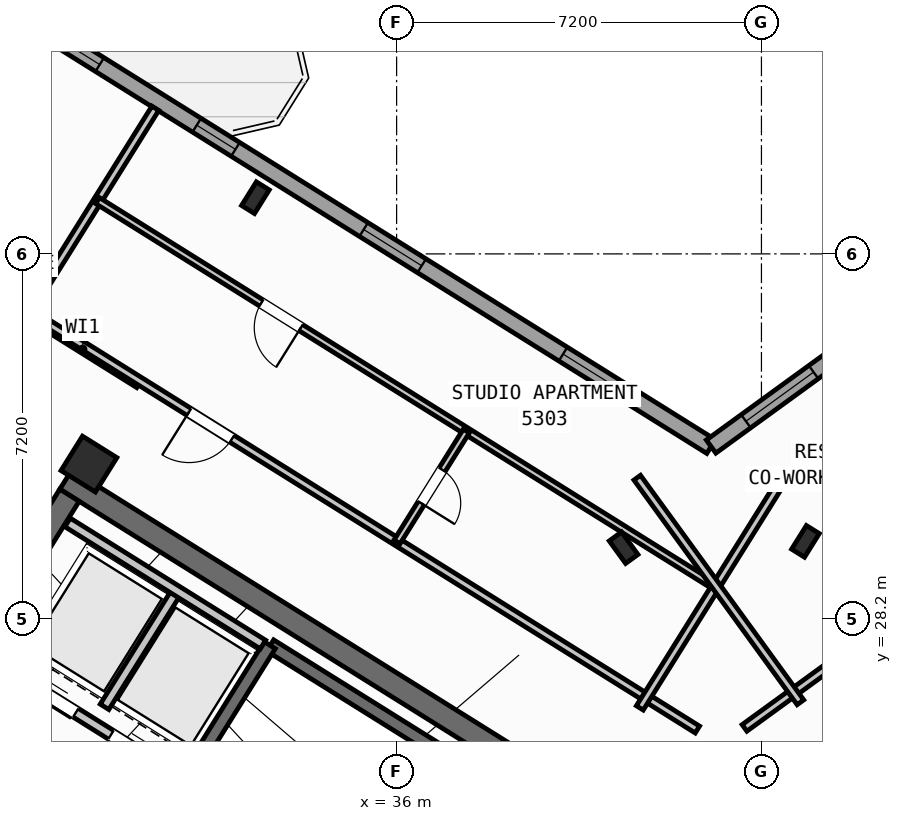
"""IFC4 building model, lengths in metres.
Left out: names, types, materials, properties, quantities, classifications, styles, units other than length and angle.
Written with IfcOpenShell. Run it as: python <this file> out.ifc"""

import sys

from ifc_helpers import new_model, si_unit, direction, frame, frame_2d, origin, origin_2d, place, context, subcontext, project, spatial, rectangle, hollow_rectangle, i_section, extrude, source, transform, mapped, element, fill, save


model = new_model("IFC4")
c1 = context("Model", 3, precision=1e-05, world=origin(), true_north=direction((0.0, 1.0)))
c2 = subcontext(c1, "Body", "Model", "MODEL_VIEW")
j1 = project(units=[si_unit("LENGTHUNIT", "METRE"), si_unit("PLANEANGLEUNIT", "RADIAN")], contexts=[c1])
p1 = place(None, origin())
s1 = spatial("IfcSite", under=j1, at=p1, CompositionType="ELEMENT")
p2 = place(p1, origin())
s2 = spatial("IfcBuilding", under=s1, at=p2, CompositionType="ELEMENT")
p3 = place(p2, frame((0.0, 0.0, 211.2)))
s3 = spatial("IfcBuildingStorey", under=s2, at=p3, CompositionType="ELEMENT", Elevation=211.2)
p4 = place(p3, frame((40.531, 24.036, 0.0), z_axis=(0.0, 0.0, 1.0), x_axis=(-0.848048787466, 0.529918157905, 0.0)))
e1 = element("IfcWall", 1, at=p4, inside=s3, PredefinedType="SHEAR", context=c2, shape_type="SweptSolid", body=[
    extrude(rectangle(XDim=13.04, YDim=0.45, at=frame_2d((6.52, 0.0))), origin(), (0.0, 0.0, 1.0), 3.35),
])
p5 = place(p3, frame((29.544, 30.636, 0.0), z_axis=(0.0, 0.0, 1.0), x_axis=(-0.529902075036, -0.848058836916, 0.0)))
e2 = element("IfcWall", 2, at=p5, inside=s3, PredefinedType="SHEAR", context=c2, shape_type="SweptSolid", body=[
    extrude(rectangle(XDim=3.625, YDim=0.45, at=frame_2d((1.812, 0.0))), origin(), (0.0, 0.0, 1.0), 3.35),
])
p6 = place(p3, frame((44.406, 24.172, 0.0), z_axis=(0.0, 0.0, 1.0), x_axis=(0.809012867805, 0.587790931986, 0.0)))
e3 = element("IfcWall", 3, at=p6, inside=s3, PredefinedType="SHEAR", context=c2, shape_type="SweptSolid", body=[
    extrude(rectangle(XDim=12.24, YDim=0.45, at=frame_2d((6.12, 0.0))), origin(), (0.0, 0.0, 1.0), 3.35),
])
m1 = source(origin(), c2, "Body", "SweptSolid", [
    extrude(i_section(OverallWidth=0.3, OverallDepth=0.55, WebThickness=0.015, FlangeThickness=0.029, at=origin_2d()), origin(), (0.0, 0.0, 1.0), 3.6),
])
for number, where, z_axis, x_axis in (
    (4, (44.068, 29.726, 0.0), (0.0, 0.0, 1.0), (-0.848, 0.53, 0.0)),
    (5, (33.213, 36.509, 0.0), (0.0, 0.0, 1.0), (-0.848, 0.53, 0.0)),
):
    element("IfcColumn", number, at=place(p3, frame(where, z_axis=z_axis, x_axis=x_axis)), inside=s3, PredefinedType="COLUMN", context=c2, shape_type="MappedRepresentation", body=[
        mapped(m1, transform((0.0, 0.0, 0.0), scale=1.0)),
    ])
m2 = source(origin(), c2, "Body", "SweptSolid", [
    extrude(hollow_rectangle(XDim=0.8, YDim=0.8, WallThickness=0.032, at=origin_2d()), origin(), (0.0, 0.0, 1.0), 3.6),
])
p7 = place(p3, frame((29.928, 31.251, 0.0), z_axis=(0.0, 0.0, 1.0), x_axis=(-0.848048096156, 0.529919264233, 0.0)))
e6 = element("IfcColumn", 6, at=p7, inside=s3, PredefinedType="COLUMN", context=c2, shape_type="MappedRepresentation", body=[
    mapped(m2, transform((0.0, 0.0, 0.0), scale=1.0)),
])
p8 = place(p3, frame((40.479, 29.601, 0.0), z_axis=(0.0, 0.0, 1.0), x_axis=(0.809016994375, 0.587785252292, 0.0)))
e7 = element("IfcColumn", 7, at=p8, inside=s3, PredefinedType="COLUMN", context=c2, shape_type="MappedRepresentation", body=[
    mapped(m1, transform((0.0, 0.0, 0.0), scale=1.0)),
])
p9 = place(p3, frame((31.76, 12.183, 0.0), z_axis=(0.0, 0.0, 1.0), x_axis=(-0.848047074256, 0.529920899612, 0.0)))
e8 = element("IfcWall", 8, at=p9, inside=s3, PredefinedType="STANDARD", context=c2, shape_type="SweptSolid", body=[
    extrude(rectangle(XDim=30.652, YDim=0.32, at=frame_2d((15.326, 0.0))), origin(), (0.0, 0.0, 1.0), 3.35),
])
p10 = place(p9, frame((15.166, 0.0, 0.0)))
e9 = element("IfcOpeningElement", 9, at=p10, cuts=e8, PredefinedType="OPENING", context=c2, shape_type="SweptSolid", body=[
    extrude(rectangle(XDim=1.2, YDim=2.15, at=frame_2d((0.6, 1.075))), frame((0.0, 0.17, 0.0), z_axis=(0.0, -1.0, 0.0), x_axis=(1.0, 0.0, 0.0)), (0.0, 0.0, 1.0), 0.34),
])
p11 = place(p9, frame((2.24, 0.0, 0.9)))
e10 = element("IfcOpeningElement", 10, at=p11, cuts=e8, PredefinedType="OPENING", context=c2, shape_type="SweptSolid", body=[
    extrude(rectangle(XDim=1.65, YDim=1.45, at=frame_2d((0.825, 0.725))), frame((0.0, 0.17, 0.0), z_axis=(0.0, -1.0, 0.0), x_axis=(1.0, 0.0, 0.0)), (0.0, 0.0, 1.0), 0.34),
])
p12 = place(p9, frame((7.469, 0.0, 0.9)))
e11 = element("IfcOpeningElement", 11, at=p12, cuts=e8, PredefinedType="OPENING", context=c2, shape_type="SweptSolid", body=[
    extrude(rectangle(XDim=1.65, YDim=1.45, at=frame_2d((0.825, 0.725))), frame((0.0, 0.17, 0.0), z_axis=(0.0, -1.0, 0.0), x_axis=(1.0, 0.0, 0.0)), (0.0, 0.0, 1.0), 0.34),
])
p13 = place(p9, frame((12.623, 0.0, 1.0)))
e12 = element("IfcOpeningElement", 12, at=p13, cuts=e8, PredefinedType="OPENING", context=c2, shape_type="SweptSolid", body=[
    extrude(rectangle(XDim=0.9, YDim=1.25, at=frame_2d((0.45, 0.625))), frame((0.0, 0.17, 0.0), z_axis=(0.0, -1.0, 0.0), x_axis=(1.0, 0.0, 0.0)), (0.0, 0.0, 1.0), 0.34),
])
p14 = place(p9, frame((19.715, 0.0, 1.0)))
e13 = element("IfcOpeningElement", 13, at=p14, cuts=e8, PredefinedType="OPENING", context=c2, shape_type="SweptSolid", body=[
    extrude(rectangle(XDim=0.9, YDim=1.25, at=frame_2d((0.45, 0.625))), frame((0.0, 0.17, 0.0), z_axis=(0.0, -1.0, 0.0), x_axis=(1.0, 0.0, 0.0)), (0.0, 0.0, 1.0), 0.34),
])
p15 = place(p9, frame((25.566, 0.0, 0.9)))
e14 = element("IfcOpeningElement", 14, at=p15, cuts=e8, PredefinedType="OPENING", context=c2, shape_type="SweptSolid", body=[
    extrude(rectangle(XDim=1.65, YDim=1.45, at=frame_2d((0.825, 0.725))), frame((0.0, 0.17, 0.0), z_axis=(0.0, -1.0, 0.0), x_axis=(1.0, 0.0, 0.0)), (0.0, 0.0, 1.0), 0.34),
])
p16 = place(p9, frame((28.896, 0.0, 1.0)))
e15 = element("IfcOpeningElement", 15, at=p16, cuts=e8, PredefinedType="OPENING", context=c2, shape_type="SweptSolid", body=[
    extrude(rectangle(XDim=0.9, YDim=1.25, at=frame_2d((0.45, 0.625))), frame((0.0, 0.17, 0.0), z_axis=(0.0, -1.0, 0.0), x_axis=(1.0, 0.0, 0.0)), (0.0, 0.0, 1.0), 0.34),
])
p17 = place(p3, frame((17.424, 47.083, 0.0), z_axis=(0.0, 0.0, 1.0), x_axis=(0.848049927979, -0.529916332693, 0.0)))
e16 = element("IfcWall", 16, at=p17, inside=s3, PredefinedType="STANDARD", context=c2, shape_type="SweptSolid", body=[
    extrude(rectangle(XDim=29.223, YDim=0.32, at=frame_2d((14.612, 0.0))), origin(), (0.0, 0.0, 1.0), 3.35),
])
p18 = place(p17, frame((2.526, 0.0, 0.0)))
e17 = element("IfcOpeningElement", 17, at=p18, cuts=e16, PredefinedType="OPENING", context=c2, shape_type="SweptSolid", body=[
    extrude(rectangle(XDim=1.05, YDim=2.15, at=frame_2d((0.525, 1.075))), frame((0.0, 0.17, 0.0), z_axis=(0.0, -1.0, 0.0), x_axis=(1.0, 0.0, 0.0)), (0.0, 0.0, 1.0), 0.34),
])
p19 = place(p17, frame((0.653, 0.0, 0.9)))
e18 = element("IfcOpeningElement", 18, at=p19, cuts=e16, PredefinedType="OPENING", context=c2, shape_type="SweptSolid", body=[
    extrude(rectangle(XDim=1.35, YDim=1.45, at=frame_2d((0.675, 0.725))), frame((0.0, 0.17, 0.0), z_axis=(0.0, -1.0, 0.0), x_axis=(1.0, 0.0, 0.0)), (0.0, 0.0, 1.0), 0.34),
])
p20 = place(p17, frame((6.897, 0.0, 1.0)))
e19 = element("IfcOpeningElement", 19, at=p20, cuts=e16, PredefinedType="OPENING", context=c2, shape_type="SweptSolid", body=[
    extrude(rectangle(XDim=0.9, YDim=1.25, at=frame_2d((0.45, 0.625))), frame((0.0, 0.17, 0.0), z_axis=(0.0, -1.0, 0.0), x_axis=(1.0, 0.0, 0.0)), (0.0, 0.0, 1.0), 0.34),
])
p21 = place(p17, frame((9.602, 0.0, 0.95)))
e20 = element("IfcOpeningElement", 20, at=p21, cuts=e16, PredefinedType="OPENING", context=c2, shape_type="SweptSolid", body=[
    extrude(rectangle(XDim=1.95, YDim=1.35, at=frame_2d((0.975, 0.675))), frame((0.0, 0.17, 0.0), z_axis=(0.0, -1.0, 0.0), x_axis=(1.0, 0.0, 0.0)), (0.0, 0.0, 1.0), 0.34),
])
p22 = place(p17, frame((14.096, 0.0, 1.0)))
e21 = element("IfcOpeningElement", 21, at=p22, cuts=e16, PredefinedType="OPENING", context=c2, shape_type="SweptSolid", body=[
    extrude(rectangle(XDim=0.9, YDim=1.25, at=frame_2d((0.45, 0.625))), frame((0.0, 0.17, 0.0), z_axis=(0.0, -1.0, 0.0), x_axis=(1.0, 0.0, 0.0)), (0.0, 0.0, 1.0), 0.34),
])
p23 = place(p17, frame((17.254, 0.0, 1.0)))
e22 = element("IfcOpeningElement", 22, at=p23, cuts=e16, PredefinedType="OPENING", context=c2, shape_type="SweptSolid", body=[
    extrude(rectangle(XDim=0.9, YDim=1.25, at=frame_2d((0.45, 0.625))), frame((0.0, 0.17, 0.0), z_axis=(0.0, -1.0, 0.0), x_axis=(1.0, 0.0, 0.0)), (0.0, 0.0, 1.0), 0.34),
])
p24 = place(p17, frame((21.139, 0.0, 0.9)))
e23 = element("IfcOpeningElement", 23, at=p24, cuts=e16, PredefinedType="OPENING", context=c2, shape_type="SweptSolid", body=[
    extrude(rectangle(XDim=1.35, YDim=1.45, at=frame_2d((0.675, 0.725))), frame((0.0, 0.17, 0.0), z_axis=(0.0, -1.0, 0.0), x_axis=(1.0, 0.0, 0.0)), (0.0, 0.0, 1.0), 0.34),
])
p25 = place(p17, frame((25.778, 0.0, 0.9)))
e24 = element("IfcOpeningElement", 24, at=p25, cuts=e16, PredefinedType="OPENING", context=c2, shape_type="SweptSolid", body=[
    extrude(rectangle(XDim=1.35, YDim=1.45, at=frame_2d((0.675, 0.725))), frame((0.0, 0.17, 0.0), z_axis=(0.0, -1.0, 0.0), x_axis=(1.0, 0.0, 0.0)), (0.0, 0.0, 1.0), 0.34),
])
p26 = place(p3, frame((42.207, 31.597, 0.0), z_axis=(0.0, 0.0, 1.0), x_axis=(0.809020333377, 0.587780656523, 0.0)))
e25 = element("IfcWall", 25, at=p26, inside=s3, PredefinedType="STANDARD", context=c2, shape_type="SweptSolid", body=[
    extrude(rectangle(XDim=15.223, YDim=0.32, at=frame_2d((7.611, 0.0))), origin(), (0.0, 0.0, 1.0), 3.35),
])
p27 = place(p26, frame((12.82, 0.0, 0.0)))
e26 = element("IfcOpeningElement", 26, at=p27, cuts=e25, PredefinedType="OPENING", context=c2, shape_type="SweptSolid", body=[
    extrude(rectangle(XDim=1.05, YDim=2.15, at=frame_2d((0.525, 1.075))), frame((0.0, 0.17, 0.0), z_axis=(0.0, -1.0, 0.0), x_axis=(1.0, 0.0, 0.0)), (0.0, 0.0, 1.0), 0.34),
])
p28 = place(p26, frame((0.85, 0.0, 0.9)))
e27 = element("IfcOpeningElement", 27, at=p28, cuts=e25, PredefinedType="OPENING", context=c2, shape_type="SweptSolid", body=[
    extrude(rectangle(XDim=1.65, YDim=1.45, at=frame_2d((0.825, 0.725))), frame((0.0, 0.17, 0.0), z_axis=(0.0, -1.0, 0.0), x_axis=(1.0, 0.0, 0.0)), (0.0, 0.0, 1.0), 0.34),
])
p29 = place(p26, frame((5.769, 0.0, 0.9)))
e28 = element("IfcOpeningElement", 28, at=p29, cuts=e25, PredefinedType="OPENING", context=c2, shape_type="SweptSolid", body=[
    extrude(rectangle(XDim=1.35, YDim=1.45, at=frame_2d((0.675, 0.725))), frame((0.0, 0.17, 0.0), z_axis=(0.0, -1.0, 0.0), x_axis=(1.0, 0.0, 0.0)), (0.0, 0.0, 1.0), 0.34),
])
p30 = place(p26, frame((10.219, 0.0, 1.0)))
e29 = element("IfcOpeningElement", 29, at=p30, cuts=e25, PredefinedType="OPENING", context=c2, shape_type="SweptSolid", body=[
    extrude(rectangle(XDim=0.9, YDim=1.25, at=frame_2d((0.45, 0.625))), frame((0.0, 0.17, 0.0), z_axis=(0.0, -1.0, 0.0), x_axis=(1.0, 0.0, 0.0)), (0.0, 0.0, 1.0), 0.34),
])
p31 = place(p3, frame((39.721, 23.788, 0.0), z_axis=(0.0, 0.0, 1.0), x_axis=(-0.848054434086, 0.529909121291, 0.0)))
e30 = element("IfcWall", 30, at=p31, inside=s3, PredefinedType="SHEAR", context=c2, shape_type="SweptSolid", body=[
    extrude(rectangle(XDim=7.33, YDim=0.26, at=frame_2d((3.665, 0.0))), origin(), (0.0, 0.0, 1.0), 3.35),
])
p32 = place(p3, frame((33.496, 27.677, 0.0), z_axis=(0.0, 0.0, 1.0), x_axis=(-0.529908658664, -0.84805472316, 0.0)))
e31 = element("IfcWall", 31, at=p32, inside=s3, PredefinedType="SHEAR", context=c2, shape_type="SweptSolid", body=[
    extrude(rectangle(XDim=3.16, YDim=0.26, at=frame_2d((1.58, 0.0))), origin(), (0.0, 0.0, 1.0), 3.35),
])
p33 = place(p3, frame((31.822, 24.998, 0.0), z_axis=(0.0, 0.0, 1.0), x_axis=(-0.848054125777, 0.529909614701, 0.0)))
e32 = element("IfcWall", 32, at=p33, inside=s3, PredefinedType="STANDARD", context=c2, shape_type="SweptSolid", body=[
    extrude(rectangle(XDim=4.668, YDim=0.2, at=frame_2d((2.334, 0.0))), origin(), (0.0, 0.0, 1.0), 3.34),
])
p34 = place(p33, frame((0.52, 0.0, 0.0)))
e33 = element("IfcOpeningElement", 33, at=p34, cuts=e32, PredefinedType="OPENING", context=c2, shape_type="SweptSolid", body=[
    extrude(rectangle(XDim=1.2, YDim=2.15, at=frame_2d((0.6, 1.075))), frame((0.0, 0.11, 0.0), z_axis=(0.0, -1.0, 0.0), x_axis=(1.0, 0.0, 0.0)), (0.0, 0.0, 1.0), 0.22),
])
p35 = place(p33, frame((2.54, 0.0, 0.0)))
e34 = element("IfcOpeningElement", 34, at=p35, cuts=e32, PredefinedType="OPENING", context=c2, shape_type="SweptSolid", body=[
    extrude(rectangle(XDim=1.2, YDim=2.15, at=frame_2d((0.6, 1.075))), frame((0.0, 0.11, 0.0), z_axis=(0.0, -1.0, 0.0), x_axis=(1.0, 0.0, 0.0)), (0.0, 0.0, 1.0), 0.22),
])
p36 = place(p3, frame((31.645, 28.716, 0.0), z_axis=(0.0, 0.0, 1.0), x_axis=(-0.52986693015, -0.848080795876, 0.0)))
e35 = element("IfcWall", 35, at=p36, inside=s3, PredefinedType="STANDARD", context=c2, shape_type="SweptSolid", body=[
    extrude(rectangle(XDim=2.66, YDim=0.2, at=frame_2d((1.33, 0.0))), origin(), (0.0, 0.0, 1.0), 3.34),
])
p37 = place(p3, frame((33.363, 27.69, 0.0), z_axis=(0.0, 0.0, 1.0), x_axis=(-0.84804957148, 0.529916903215, 0.0)))
e36 = element("IfcWall", 36, at=p37, inside=s3, PredefinedType="STANDARD", context=c2, shape_type="SweptSolid", body=[
    extrude(rectangle(XDim=4.548, YDim=0.2, at=frame_2d((2.274, 0.0))), origin(), (0.0, 0.0, 1.0), 3.34),
])
p38 = place(p3, frame((30.914, 32.829, 0.0), z_axis=(0.0, 0.0, 1.0), x_axis=(-0.848008813643, 0.529982124211, 0.0)))
e37 = element("IfcWall", 37, at=p38, inside=s3, PredefinedType="PARTITIONING", context=c2, shape_type="SweptSolid", body=[
    extrude(rectangle(XDim=2.61, YDim=0.16, at=frame_2d((1.305, 0.0))), origin(), (0.0, 0.0, 1.0), 3.34),
])
p39 = place(p3, frame((31.239, 38.274, 0.0), z_axis=(0.0, 0.0, 1.0), x_axis=(-0.529925472745, -0.848044216616, 0.0)))
e38 = element("IfcWall", 38, at=p39, inside=s3, PredefinedType="PARTITIONING", context=c2, shape_type="SweptSolid", body=[
    extrude(rectangle(XDim=11.65, YDim=0.16, at=frame_2d((5.825, 0.0))), origin(), (0.0, 0.0, 1.0), 3.34),
])
p40 = place(p3, frame((41.936, 26.012, 0.0), z_axis=(0.0, 0.0, 1.0), x_axis=(-0.848051154596, 0.529914369676, 0.0)))
e39 = element("IfcWall", 39, at=p40, inside=s3, PredefinedType="PARTITIONING", context=c2, shape_type="SweptSolid", body=[
    extrude(rectangle(XDim=15.57, YDim=0.16, at=frame_2d((7.785, 0.0))), origin(), (0.0, 0.0, 1.0), 3.34),
])
p41 = place(p40, frame((10.83, 0.0, 0.0)))
e40 = element("IfcOpeningElement", 40, at=p41, cuts=e39, PredefinedType="OPENING", context=c2, shape_type="SweptSolid", body=[
    extrude(rectangle(XDim=1.0, YDim=2.1, at=frame_2d((0.5, 1.05))), frame((0.0, 0.09, 0.0), z_axis=(0.0, -1.0, 0.0), x_axis=(1.0, 0.0, 0.0)), (0.0, 0.0, 1.0), 0.18),
])
p42 = place(p3, frame((43.704, 31.086, 0.0), z_axis=(0.0, 0.0, 1.0), x_axis=(-0.529906828443, -0.848055866774, 0.0)))
e41 = element("IfcWall", 41, at=p42, inside=s3, PredefinedType="PARTITIONING", context=c2, shape_type="SweptSolid", body=[
    extrude(rectangle(XDim=5.48, YDim=0.16, at=frame_2d((2.74, 0.0))), origin(), (0.0, 0.0, 1.0), 3.34),
])
p43 = place(p3, frame((42.226, 28.873, 0.0), z_axis=(0.0, 0.0, 1.0), x_axis=(-0.848049134363, 0.529917602752, 0.0)))
e42 = element("IfcWall", 42, at=p43, inside=s3, PredefinedType="PLUMBINGWALL", context=c2, shape_type="SweptSolid", body=[
    extrude(rectangle(XDim=14.3, YDim=0.14, at=frame_2d((7.15, 0.0))), origin(), (0.0, 0.0, 1.0), 3.34),
])
p44 = place(p43, frame((9.57, 0.0, 0.0)))
e43 = element("IfcOpeningElement", 43, at=p44, cuts=e42, PredefinedType="OPENING", context=c2, shape_type="SweptSolid", body=[
    extrude(rectangle(XDim=0.92, YDim=2.08, at=frame_2d((0.46, 1.04))), frame((0.0, 0.08, 0.0), z_axis=(0.0, -1.0, 0.0), x_axis=(1.0, 0.0, 0.0)), (0.0, 0.0, 1.0), 0.16),
])
p45 = place(p3, frame((37.375, 31.904, 0.0), z_axis=(0.0, 0.0, 1.0), x_axis=(-0.529913878929, -0.848051461244, 0.0)))
e44 = element("IfcWall", 44, at=p45, inside=s3, PredefinedType="PLUMBINGWALL", context=c2, shape_type="SweptSolid", body=[
    extrude(rectangle(XDim=2.58, YDim=0.14, at=frame_2d((1.29, 0.0))), origin(), (0.0, 0.0, 1.0), 3.34),
])
p46 = place(p45, frame((0.9, 0.0, 0.0)))
e45 = element("IfcOpeningElement", 45, at=p46, cuts=e44, PredefinedType="OPENING", context=c2, shape_type="SweptSolid", body=[
    extrude(rectangle(XDim=0.78, YDim=2.05, at=frame_2d((0.39, 1.025))), frame((0.0, 0.08, 0.0), z_axis=(0.0, -1.0, 0.0), x_axis=(1.0, 0.0, 0.0)), (0.0, 0.0, 1.0), 0.16),
])
p47 = place(p3, frame((42.866, 26.044, 0.0), z_axis=(0.0, 0.0, 1.0), x_axis=(0.809020254154, 0.587780765566, 0.0)))
e46 = element("IfcWall", 46, at=p47, inside=s3, PredefinedType="PARTITIONING", context=c2, shape_type="SweptSolid", body=[
    extrude(rectangle(XDim=14.67, YDim=0.16, at=frame_2d((7.335, 0.0))), origin(), (0.0, 0.0, 1.0), 3.34),
])
p48 = place(p47, frame((3.215, 0.0, 0.0)))
e47 = element("IfcOpeningElement", 47, at=p48, cuts=e46, PredefinedType="OPENING", context=c2, shape_type="SweptSolid", body=[
    extrude(rectangle(XDim=1.0, YDim=2.1, at=frame_2d((0.5, 1.05))), frame((0.0, 0.09, 0.0), z_axis=(0.0, -1.0, 0.0), x_axis=(1.0, 0.0, 0.0)), (0.0, 0.0, 1.0), 0.18),
])
p49 = place(p47, frame((9.915, 0.0, 0.0)))
e48 = element("IfcOpeningElement", 48, at=p49, cuts=e46, PredefinedType="OPENING", context=c2, shape_type="SweptSolid", body=[
    extrude(rectangle(XDim=1.0, YDim=2.1, at=frame_2d((0.5, 1.05))), frame((0.0, 0.09, 0.0), z_axis=(0.0, -1.0, 0.0), x_axis=(1.0, 0.0, 0.0)), (0.0, 0.0, 1.0), 0.18),
])
p50 = place(p3, frame((43.969, 26.55, 0.0), z_axis=(0.0, 0.0, 1.0), x_axis=(-0.587776919386, 0.80902304852, 0.0)))
e49 = element("IfcWall", 49, at=p50, inside=s3, PredefinedType="PARTITIONING", context=c2, shape_type="SweptSolid", body=[
    extrude(rectangle(XDim=5.48, YDim=0.16, at=frame_2d((2.74, 0.0))), origin(), (0.0, 0.0, 1.0), 3.34),
])
m3 = source(origin(), c2, "Body", "SweptSolid", [
    extrude(rectangle(XDim=0.9, YDim=1.25, at=frame_2d((0.45, 0.625))), frame((0.0, 0.03, 0.0), z_axis=(0.0, -1.0, 0.0), x_axis=(1.0, 0.0, 0.0)), (0.0, 0.0, 1.0), 0.06),
])
p51 = place(p22, origin())
e50 = element("IfcWindow", 50, at=p51, inside=s3, PartitioningType="SINGLE_PANEL", PredefinedType="WINDOW", context=c2, shape_type="MappedRepresentation", body=[
    mapped(m3, transform((0.0, 0.0, 0.0), scale=1.0)),
])
fill(e21, e50)
p52 = place(p23, origin())
e51 = element("IfcWindow", 51, at=p52, inside=s3, PartitioningType="SINGLE_PANEL", PredefinedType="WINDOW", context=c2, shape_type="MappedRepresentation", body=[
    mapped(m3, transform((0.0, 0.0, 0.0), scale=1.0)),
])
fill(e22, e51)
m4 = source(origin(), c2, "Body", "SweptSolid", [
    extrude(rectangle(XDim=1.35, YDim=1.45, at=frame_2d((0.675, 0.725))), frame((0.0, 0.03, 0.0), z_axis=(0.0, -1.0, 0.0), x_axis=(1.0, 0.0, 0.0)), (0.0, 0.0, 1.0), 0.06),
])
p53 = place(p24, origin())
e52 = element("IfcWindow", 52, at=p53, inside=s3, PartitioningType="SINGLE_PANEL", PredefinedType="WINDOW", context=c2, shape_type="MappedRepresentation", body=[
    mapped(m4, transform((0.0, 0.0, 0.0), scale=1.0)),
])
fill(e23, e52)
p54 = place(p25, origin())
e53 = element("IfcWindow", 53, at=p54, inside=s3, PartitioningType="SINGLE_PANEL", PredefinedType="WINDOW", context=c2, shape_type="MappedRepresentation", body=[
    mapped(m4, transform((0.0, 0.0, 0.0), scale=1.0)),
])
fill(e24, e53)
m5 = source(origin(), c2, "Body", "SweptSolid", [
    extrude(rectangle(XDim=1.65, YDim=1.45, at=frame_2d((0.825, 0.725))), frame((0.0, 0.03, 0.0), z_axis=(0.0, -1.0, 0.0), x_axis=(1.0, 0.0, 0.0)), (0.0, 0.0, 1.0), 0.06),
])
p55 = place(p28, origin())
e54 = element("IfcWindow", 54, at=p55, inside=s3, PartitioningType="SINGLE_PANEL", PredefinedType="WINDOW", context=c2, shape_type="MappedRepresentation", body=[
    mapped(m5, transform((0.0, 0.0, 0.0), scale=1.0)),
])
fill(e27, e54)
m6 = source(origin(), c2, "Body", "SweptSolid", [
    extrude(rectangle(XDim=1.2, YDim=2.15, at=frame_2d((0.6, 1.075))), frame((0.0, 0.025, 0.0), z_axis=(0.0, -1.0, 0.0), x_axis=(1.0, 0.0, 0.0)), (0.0, 0.0, 1.0), 0.05),
])
p56 = place(p34, origin())
e55 = element("IfcDoor", 55, at=p56, inside=s3, OperationType="DOUBLE_DOOR_SLIDING", PredefinedType="DOOR", context=c2, shape_type="MappedRepresentation", body=[
    mapped(m6, transform((0.0, 0.0, 0.0), scale=1.0)),
])
fill(e33, e55)
p57 = place(p35, origin())
e56 = element("IfcDoor", 56, at=p57, inside=s3, OperationType="DOUBLE_DOOR_SLIDING", PredefinedType="DOOR", context=c2, shape_type="MappedRepresentation", body=[
    mapped(m6, transform((0.0, 0.0, 0.0), scale=1.0)),
])
fill(e34, e56)
m7 = source(origin(), c2, "Body", "SweptSolid", [
    extrude(rectangle(XDim=1.0, YDim=2.1, at=frame_2d((0.5, 1.05))), frame((0.0, 0.025, 0.0), z_axis=(0.0, -1.0, 0.0), x_axis=(1.0, 0.0, 0.0)), (0.0, 0.0, 1.0), 0.05),
])
p58 = place(p41, origin())
e57 = element("IfcDoor", 57, at=p58, inside=s3, OperationType="SINGLE_SWING_RIGHT", PredefinedType="DOOR", context=c2, shape_type="MappedRepresentation", body=[
    mapped(m7, transform((0.0, 0.0, 0.0), scale=1.0)),
])
fill(e40, e57)
m8 = source(origin(), c2, "Body", "SweptSolid", [
    extrude(rectangle(XDim=0.92, YDim=2.08, at=frame_2d((0.46, 1.04))), frame((0.0, 0.025, 0.0), z_axis=(0.0, -1.0, 0.0), x_axis=(1.0, 0.0, 0.0)), (0.0, 0.0, 1.0), 0.05),
])
p59 = place(p44, origin())
e58 = element("IfcDoor", 58, at=p59, inside=s3, OperationType="SINGLE_SWING_LEFT", PredefinedType="DOOR", context=c2, shape_type="MappedRepresentation", body=[
    mapped(m8, transform((0.0, 0.0, 0.0), scale=1.0)),
])
fill(e43, e58)
m9 = source(origin(), c2, "Body", "SweptSolid", [
    extrude(rectangle(XDim=0.78, YDim=2.05, at=frame_2d((0.39, 1.025))), frame((0.0, 0.025, 0.0), z_axis=(0.0, -1.0, 0.0), x_axis=(1.0, 0.0, 0.0)), (0.0, 0.0, 1.0), 0.05),
])
p60 = place(p46, origin())
e59 = element("IfcDoor", 59, at=p60, inside=s3, OperationType="SINGLE_SWING_RIGHT", PredefinedType="DOOR", context=c2, shape_type="MappedRepresentation", body=[
    mapped(m9, transform((0.0, 0.0, 0.0), scale=1.0)),
])
fill(e45, e59)
save(model, sys.argv[1])
